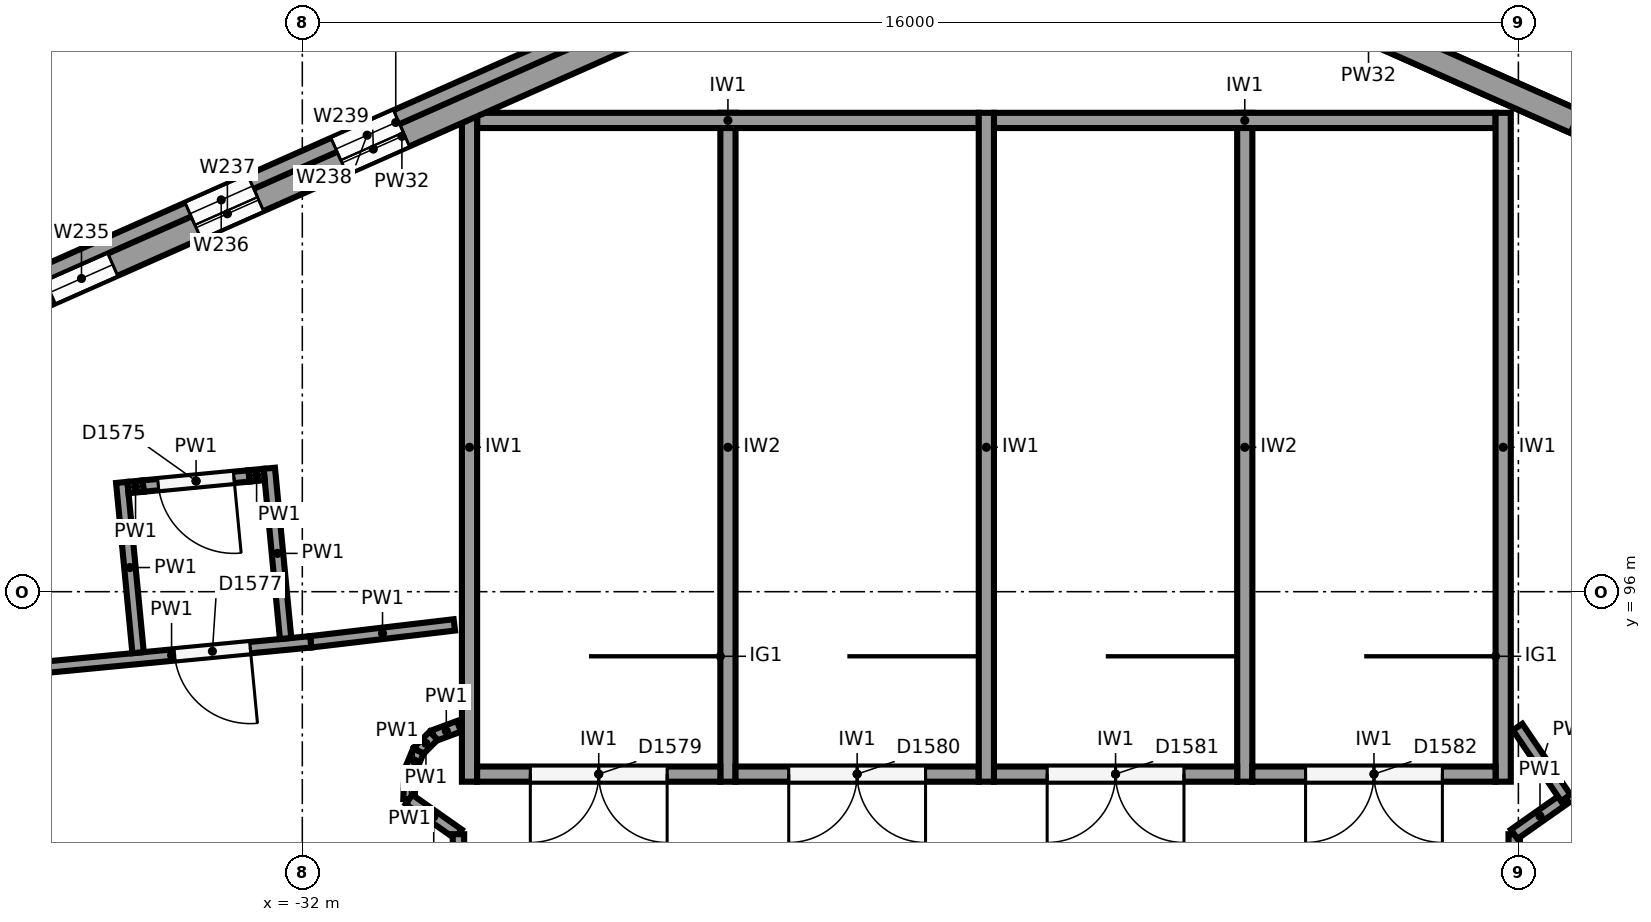
"""IFC4 building model, lengths in metres.
Left out: names, types, materials, properties, quantities, classifications, styles, units other than length and angle.
Written with IfcOpenShell. Run it as: python <this file> out.ifc"""

import sys

from ifc_helpers import new_model, si_unit, direction, frame, frame_2d, origin, place, context, subcontext, project, spatial, polyline, rectangle, outline, extrude, element, fill, save


model = new_model("IFC4")
c1 = context("Model", 3, precision=1e-05, world=origin(), true_north=direction((0.0, 1.0)))
c2 = subcontext(c1, "Body", "Model", "MODEL_VIEW")
j1 = project(units=[si_unit("LENGTHUNIT", "METRE"), si_unit("PLANEANGLEUNIT", "RADIAN")], contexts=[c1])
p1 = place(None, origin())
s1 = spatial("IfcSite", under=j1, at=p1, CompositionType="ELEMENT")
p2 = place(p1, origin())
s2 = spatial("IfcBuilding", under=s1, at=p2, CompositionType="ELEMENT")
p3 = place(p2, frame((0.0, 0.0, 24.0)))
s3 = spatial("IfcBuildingStorey", under=s2, at=p3, CompositionType="ELEMENT", Elevation=24.0)
p4 = place(p3, frame((-22.462, 105.38, 0.0), z_axis=(0.0, 0.0, 1.0), x_axis=(0.914133039962, -0.405414337745, 0.0)))
e1 = element("IfcWall", 1, at=p4, inside=s3, PredefinedType="SOLIDWALL", context=c2, shape_type="SweptSolid", body=[
    extrude(rectangle(XDim=9.824, YDim=0.32, at=frame_2d((4.912, 0.0))), origin(), (0.0, 0.0, 1.0), 6.0),
])
p5 = place(p4, frame((7.874, 0.0, 1.0)))
e2 = element("IfcOpeningElement", 2, at=p5, cuts=e1, PredefinedType="OPENING", context=c2, shape_type="SweptSolid", body=[
    extrude(rectangle(XDim=0.9, YDim=3.25, at=frame_2d((0.45, 1.625))), frame((0.0, 0.17, 0.0), z_axis=(0.0, -1.0, 0.0), x_axis=(1.0, 0.0, 0.0)), (0.0, 0.0, 1.0), 0.34),
])
p6 = place(p3, frame((-22.462, 105.38, 6.0), z_axis=(0.0, 0.0, 1.0), x_axis=(0.914133039962, -0.405414337745, 0.0)))
e3 = element("IfcWall", 3, at=p6, inside=s3, PredefinedType="SOLIDWALL", context=c2, shape_type="SweptSolid", body=[
    extrude(outline(polyline([(0.0, 0.0), (9.824, 0.0), (9.824, 6.505), (0.0, 10.488), (0.0, 0.0)])), frame((0.0, 0.16, 0.0), z_axis=(0.0, -1.0, 0.0), x_axis=(1.0, 0.0, 0.0)), (0.0, 0.0, 1.0), 0.32),
])
p7 = place(p6, frame((7.874, 0.0, 1.6)))
e4 = element("IfcOpeningElement", 4, at=p7, cuts=e3, PredefinedType="OPENING", context=c2, shape_type="SweptSolid", body=[
    extrude(rectangle(XDim=0.9, YDim=3.0, at=frame_2d((0.45, 1.5))), frame((0.0, 0.17, 0.0), z_axis=(0.0, -1.0, 0.0), x_axis=(1.0, 0.0, 0.0)), (0.0, 0.0, 1.0), 0.34),
])
p8 = place(p3, frame((-37.922, 98.782, 0.0), z_axis=(0.0, 0.0, 1.0), x_axis=(0.914138897099, 0.405401130748, 0.0)))
e5 = element("IfcWall", 5, at=p8, inside=s3, PredefinedType="SOLIDWALL", context=c2, shape_type="SweptSolid", body=[
    extrude(rectangle(XDim=15.824, YDim=0.32, at=frame_2d((7.912, 0.0))), origin(), (0.0, 0.0, 1.0), 6.0),
])
p9 = place(p8, frame((0.75, 0.0, 1.0)))
e6 = element("IfcOpeningElement", 6, at=p9, cuts=e5, PredefinedType="OPENING", context=c2, shape_type="SweptSolid", body=[
    extrude(rectangle(XDim=0.9, YDim=3.25, at=frame_2d((0.45, 1.625))), frame((0.0, 0.17, 0.0), z_axis=(0.0, -1.0, 0.0), x_axis=(1.0, 0.0, 0.0)), (0.0, 0.0, 1.0), 0.34),
])
p10 = place(p8, frame((2.85, 0.0, 1.0)))
e7 = element("IfcOpeningElement", 7, at=p10, cuts=e5, PredefinedType="OPENING", context=c2, shape_type="SweptSolid", body=[
    extrude(rectangle(XDim=0.9, YDim=3.25, at=frame_2d((0.45, 1.625))), frame((0.0, 0.17, 0.0), z_axis=(0.0, -1.0, 0.0), x_axis=(1.0, 0.0, 0.0)), (0.0, 0.0, 1.0), 0.34),
])
p11 = place(p8, frame((4.95, 0.0, 1.0)))
e8 = element("IfcOpeningElement", 8, at=p11, cuts=e5, PredefinedType="OPENING", context=c2, shape_type="SweptSolid", body=[
    extrude(rectangle(XDim=0.9, YDim=3.25, at=frame_2d((0.45, 1.625))), frame((0.0, 0.17, 0.0), z_axis=(0.0, -1.0, 0.0), x_axis=(1.0, 0.0, 0.0)), (0.0, 0.0, 1.0), 0.34),
])
p12 = place(p8, frame((7.05, 0.0, 1.0)))
e9 = element("IfcOpeningElement", 9, at=p12, cuts=e5, PredefinedType="OPENING", context=c2, shape_type="SweptSolid", body=[
    extrude(rectangle(XDim=0.9, YDim=3.25, at=frame_2d((0.45, 1.625))), frame((0.0, 0.17, 0.0), z_axis=(0.0, -1.0, 0.0), x_axis=(1.0, 0.0, 0.0)), (0.0, 0.0, 1.0), 0.34),
])
p13 = place(p3, frame((-38.003, 98.965, 6.0), z_axis=(0.0, 0.0, 1.0), x_axis=(0.914136361455, 0.405406848322, 0.0)))
e10 = element("IfcWall", 10, at=p13, inside=s3, PredefinedType="SOLIDWALL", context=c2, shape_type="SweptSolid", body=[
    extrude(outline(polyline([(0.0, 0.0), (15.824, 0.0), (15.824, 10.488), (0.0, 4.072), (0.0, 0.0)])), frame((0.0, 0.16, 0.0), z_axis=(0.0, -1.0, 0.0), x_axis=(1.0, 0.0, 0.0)), (0.0, 0.0, 1.0), 0.32),
])
p14 = place(p13, frame((4.95, 0.0, 1.6)))
e11 = element("IfcOpeningElement", 11, at=p14, cuts=e10, PredefinedType="OPENING", context=c2, shape_type="SweptSolid", body=[
    extrude(rectangle(XDim=0.9, YDim=3.0, at=frame_2d((0.45, 1.5))), frame((0.0, 0.17, 0.0), z_axis=(0.0, -1.0, 0.0), x_axis=(1.0, 0.0, 0.0)), (0.0, 0.0, 1.0), 0.34),
])
p15 = place(p13, frame((7.05, 0.0, 1.6)))
e12 = element("IfcOpeningElement", 12, at=p15, cuts=e10, PredefinedType="OPENING", context=c2, shape_type="SweptSolid", body=[
    extrude(rectangle(XDim=0.9, YDim=3.0, at=frame_2d((0.45, 1.5))), frame((0.0, 0.17, 0.0), z_axis=(0.0, -1.0, 0.0), x_axis=(1.0, 0.0, 0.0)), (0.0, 0.0, 1.0), 0.34),
])
for number, where, z_axis, x_axis in (
    (13, (-16.2, 102.3, 0.0), (0.0, 0.0, 1.0), (0.0, -1.0, 0.0)),
    (14, (-23.0, 102.3, 0.0), (0.0, 0.0, 1.0), (0.0, -1.0, 0.0)),
    (15, (-29.8, 102.3, 0.0), (0.0, 0.0, 1.0), (0.0, -1.0, 0.0)),
):
    element("IfcWall", number, at=place(p3, frame(where, z_axis=z_axis, x_axis=x_axis)), inside=s3, PredefinedType="SHEAR", context=c2, shape_type="SweptSolid", body=[
        extrude(rectangle(XDim=8.8, YDim=0.2, at=frame_2d((4.4, 0.0))), origin(), (0.0, 0.0, 1.0), 5.75),
    ])
for number, where, z_axis, x_axis in (
    (16, (-16.3, 102.2, 0.0), (0.0, 0.0, 1.0), (-1.0, 0.0, 0.0)),
    (17, (-23.1, 102.2, 0.0), (0.0, 0.0, 1.0), (-1.0, 0.0, 0.0)),
):
    element("IfcWall", number, at=place(p3, frame(where, z_axis=z_axis, x_axis=x_axis)), inside=s3, PredefinedType="SHEAR", context=c2, shape_type="SweptSolid", body=[
        extrude(rectangle(XDim=6.6, YDim=0.2, at=frame_2d((3.3, 0.0))), origin(), (0.0, 0.0, 1.0), 5.75),
    ])
for number, where, z_axis, x_axis in (
    (18, (-19.6, 102.3, 0.0), (0.0, 0.0, 1.0), (0.0, -1.0, 0.0)),
    (19, (-26.4, 102.3, 0.0), (0.0, 0.0, 1.0), (0.0, -1.0, 0.0)),
):
    element("IfcWall", number, at=place(p3, frame(where, z_axis=z_axis, x_axis=x_axis)), inside=s3, PredefinedType="SHEAR", context=c2, shape_type="SweptSolid", body=[
        extrude(rectangle(XDim=8.8, YDim=0.2, at=frame_2d((4.4, 0.0))), origin(), (0.0, 0.0, 1.0), 5.75),
    ])
p16 = place(p3, frame((-16.3, 93.6, 0.0), z_axis=(0.0, 0.0, 1.0), x_axis=(-1.0, 0.0, 0.0)))
e20 = element("IfcWall", 20, at=p16, inside=s3, PredefinedType="SHEAR", context=c2, shape_type="SweptSolid", body=[
    extrude(rectangle(XDim=3.2, YDim=0.2, at=frame_2d((1.6, 0.0))), origin(), (0.0, 0.0, 1.0), 5.75),
])
p17 = place(p16, frame((0.7, 0.0, 0.0)))
e21 = element("IfcOpeningElement", 21, at=p17, cuts=e20, PredefinedType="OPENING", context=c2, shape_type="SweptSolid", body=[
    extrude(rectangle(XDim=1.8, YDim=2.1, at=frame_2d((0.9, 1.05))), frame((0.0, 0.11, 0.0), z_axis=(0.0, -1.0, 0.0), x_axis=(1.0, 0.0, 0.0)), (0.0, 0.0, 1.0), 0.22),
])
p18 = place(p3, frame((-19.7, 93.6, 0.0), z_axis=(0.0, 0.0, 1.0), x_axis=(-1.0, 0.0, 0.0)))
e22 = element("IfcWall", 22, at=p18, inside=s3, PredefinedType="SHEAR", context=c2, shape_type="SweptSolid", body=[
    extrude(rectangle(XDim=3.2, YDim=0.2, at=frame_2d((1.6, 0.0))), origin(), (0.0, 0.0, 1.0), 5.75),
])
p19 = place(p18, frame((0.7, 0.0, 0.0)))
e23 = element("IfcOpeningElement", 23, at=p19, cuts=e22, PredefinedType="OPENING", context=c2, shape_type="SweptSolid", body=[
    extrude(rectangle(XDim=1.8, YDim=2.1, at=frame_2d((0.9, 1.05))), frame((0.0, 0.11, 0.0), z_axis=(0.0, -1.0, 0.0), x_axis=(1.0, 0.0, 0.0)), (0.0, 0.0, 1.0), 0.22),
])
p20 = place(p3, frame((-23.1, 93.6, 0.0), z_axis=(0.0, 0.0, 1.0), x_axis=(-1.0, 0.0, 0.0)))
e24 = element("IfcWall", 24, at=p20, inside=s3, PredefinedType="SHEAR", context=c2, shape_type="SweptSolid", body=[
    extrude(rectangle(XDim=3.2, YDim=0.2, at=frame_2d((1.6, 0.0))), origin(), (0.0, 0.0, 1.0), 5.75),
])
p21 = place(p20, frame((0.7, 0.0, 0.0)))
e25 = element("IfcOpeningElement", 25, at=p21, cuts=e24, PredefinedType="OPENING", context=c2, shape_type="SweptSolid", body=[
    extrude(rectangle(XDim=1.8, YDim=2.1, at=frame_2d((0.9, 1.05))), frame((0.0, 0.11, 0.0), z_axis=(0.0, -1.0, 0.0), x_axis=(1.0, 0.0, 0.0)), (0.0, 0.0, 1.0), 0.22),
])
p22 = place(p3, frame((-26.5, 93.6, 0.0), z_axis=(0.0, 0.0, 1.0), x_axis=(-1.0, 0.0, 0.0)))
e26 = element("IfcWall", 26, at=p22, inside=s3, PredefinedType="SHEAR", context=c2, shape_type="SweptSolid", body=[
    extrude(rectangle(XDim=3.2, YDim=0.2, at=frame_2d((1.6, 0.0))), origin(), (0.0, 0.0, 1.0), 5.75),
])
p23 = place(p22, frame((0.7, 0.0, 0.0)))
e27 = element("IfcOpeningElement", 27, at=p23, cuts=e26, PredefinedType="OPENING", context=c2, shape_type="SweptSolid", body=[
    extrude(rectangle(XDim=1.8, YDim=2.1, at=frame_2d((0.9, 1.05))), frame((0.0, 0.11, 0.0), z_axis=(0.0, -1.0, 0.0), x_axis=(1.0, 0.0, 0.0)), (0.0, 0.0, 1.0), 0.22),
])
p24 = place(p3, frame((-30.0, 95.563, 0.0), z_axis=(0.0, 0.0, 1.0), x_axis=(-0.993124293788, -0.117064670536, 0.0)))
e28 = element("IfcWall", 28, at=p24, inside=s3, PredefinedType="PARTITIONING", context=c2, shape_type="SweptSolid", body=[
    extrude(rectangle(XDim=1.902, YDim=0.15, at=frame_2d((0.951, 0.0))), origin(), (0.0, 0.0, 1.0), 5.4),
])
p25 = place(p3, frame((-31.889, 95.34, 0.0), z_axis=(0.0, 0.0, 1.0), x_axis=(-0.995436828667, -0.095422849118, 0.0)))
e29 = element("IfcWall", 29, at=p25, inside=s3, PredefinedType="PARTITIONING", context=c2, shape_type="SweptSolid", body=[
    extrude(rectangle(XDim=3.679, YDim=0.15, at=frame_2d((1.84, 0.0))), origin(), (0.0, 0.0, 1.0), 5.4),
])
p26 = place(p25, frame((0.8, 0.0, 0.0)))
e30 = element("IfcOpeningElement", 30, at=p26, cuts=e29, PredefinedType="OPENING", context=c2, shape_type="SweptSolid", body=[
    extrude(rectangle(XDim=1.0, YDim=2.1, at=frame_2d((0.5, 1.05))), frame((0.0, 0.085, 0.0), z_axis=(0.0, -1.0, 0.0), x_axis=(1.0, 0.0, 0.0)), (0.0, 0.0, 1.0), 0.17),
])
p27 = place(p3, frame((-29.938, 94.229, 0.0), z_axis=(0.0, 0.0, 1.0), x_axis=(-0.937674325327, -0.347515265308, 0.0)))
e31 = element("IfcWall", 31, at=p27, inside=s3, PredefinedType="PARTITIONING", context=c2, shape_type="SweptSolid", body=[
    extrude(rectangle(XDim=0.356, YDim=0.15, at=frame_2d((0.178, 0.0))), origin(), (0.0, 0.0, 1.0), 5.4),
])
p28 = place(p3, frame((-30.272, 94.105, 0.0), z_axis=(0.0, 0.0, 1.0), x_axis=(-0.707534941396, -0.706678361564, 0.0)))
e32 = element("IfcWall", 32, at=p28, inside=s3, PredefinedType="PARTITIONING", context=c2, shape_type="SweptSolid", body=[
    extrude(rectangle(XDim=0.285, YDim=0.15, at=frame_2d((0.143, 0.0))), origin(), (0.0, 0.0, 1.0), 5.4),
])
p29 = place(p3, frame((-30.474, 93.904, 0.0), z_axis=(0.0, 0.0, 1.0), x_axis=(-0.382275228123, -0.924048510611, 0.0)))
e33 = element("IfcWall", 33, at=p29, inside=s3, PredefinedType="PARTITIONING", context=c2, shape_type="SweptSolid", body=[
    extrude(rectangle(XDim=0.282, YDim=0.15, at=frame_2d((0.141, 0.0))), origin(), (0.0, 0.0, 1.0), 5.4),
])
p30 = place(p3, frame((-30.582, 93.643, 0.0), z_axis=(0.0, 0.0, 1.0), x_axis=(-0.038982051143, -0.999239910977, 0.0)))
e34 = element("IfcWall", 34, at=p30, inside=s3, PredefinedType="PARTITIONING", context=c2, shape_type="SweptSolid", body=[
    extrude(rectangle(XDim=0.376, YDim=0.15, at=frame_2d((0.188, 0.0))), origin(), (0.0, 0.0, 1.0), 5.4),
])
p31 = place(p3, frame((-30.596, 93.268, 0.0), z_axis=(0.0, 0.0, 1.0), x_axis=(0.817630031149, -0.575743981439, 0.0)))
e35 = element("IfcWall", 35, at=p31, inside=s3, PredefinedType="PARTITIONING", context=c2, shape_type="SweptSolid", body=[
    extrude(rectangle(XDim=0.796, YDim=0.15, at=frame_2d((0.398, 0.0))), origin(), (0.0, 0.0, 1.0), 5.4),
])
p32 = place(p3, frame((-29.945, 92.809, 0.0), z_axis=(0.0, 0.0, 1.0), x_axis=(-0.005947670427, -0.999982312452, 0.0)))
e36 = element("IfcWall", 36, at=p32, inside=s3, PredefinedType="PARTITIONING", context=c2, shape_type="SweptSolid", body=[
    extrude(rectangle(XDim=5.049, YDim=0.15, at=frame_2d((2.524, 0.0))), origin(), (0.0, 0.0, 1.0), 5.4),
])
p33 = place(p32, frame((1.85, 0.0, 0.0)))
e37 = element("IfcOpeningElement", 37, at=p33, cuts=e36, PredefinedType="OPENING", context=c2, shape_type="SweptSolid", body=[
    extrude(rectangle(XDim=1.8, YDim=2.1, at=frame_2d((0.9, 1.05))), frame((0.0, 0.085, 0.0), z_axis=(0.0, -1.0, 0.0), x_axis=(1.0, 0.0, 0.0)), (0.0, 0.0, 1.0), 0.17),
])
p34 = place(p3, frame((-16.055, 88.71, 0.0), z_axis=(0.0, 0.0, 1.0), x_axis=(0.0, 1.0, 0.0)))
e38 = element("IfcWall", 38, at=p34, inside=s3, PredefinedType="PARTITIONING", context=c2, shape_type="SweptSolid", body=[
    extrude(rectangle(XDim=4.099, YDim=0.15, at=frame_2d((2.05, 0.0))), origin(), (0.0, 0.0, 1.0), 5.4),
])
p35 = place(p3, frame((-16.055, 92.809, 0.0), z_axis=(0.0, 0.0, 1.0), x_axis=(0.81774999294, 0.575573582652, 0.0)))
e39 = element("IfcWall", 39, at=p35, inside=s3, PredefinedType="PARTITIONING", context=c2, shape_type="SweptSolid", body=[
    extrude(rectangle(XDim=0.83, YDim=0.15, at=frame_2d((0.415, 0.0))), origin(), (0.0, 0.0, 1.0), 5.4),
])
p36 = place(p3, frame((-15.376, 93.287, 0.0), z_axis=(0.0, 0.0, 1.0), x_axis=(-0.562120553728, 0.827055308354, 0.0)))
e40 = element("IfcWall", 40, at=p36, inside=s3, PredefinedType="PARTITIONING", context=c2, shape_type="SweptSolid", body=[
    extrude(rectangle(XDim=1.128, YDim=0.15, at=frame_2d((0.564, 0.0))), origin(), (0.0, 0.0, 1.0), 5.4),
])
for number, where, z_axis, x_axis in (
    (41, (-32.22, 95.384, 0.0), (0.0, 0.0, 1.0), (-0.095, 0.995, 0.0)),
    (42, (-34.161, 95.198, 0.0), (0.0, 0.0, 1.0), (-0.095, 0.995, 0.0)),
):
    element("IfcWall", number, at=place(p3, frame(where, z_axis=z_axis, x_axis=x_axis)), inside=s3, PredefinedType="PARTITIONING", context=c2, shape_type="SweptSolid", body=[
        extrude(rectangle(XDim=2.25, YDim=0.15, at=frame_2d((1.125, 0.0))), origin(), (0.0, 0.0, 1.0), 5.4),
    ])
p37 = place(p3, frame((-32.502, 97.542, 0.0), z_axis=(0.0, 0.0, 1.0), x_axis=(-0.995451449832, -0.095270200107, 0.0)))
e43 = element("IfcWall", 43, at=p37, inside=s3, PredefinedType="PARTITIONING", context=c2, shape_type="SweptSolid", body=[
    extrude(rectangle(XDim=0.2, YDim=0.15, at=frame_2d((0.1, 0.0))), origin(), (0.0, 0.0, 1.0), 5.4),
])
p38 = place(p3, frame((-32.701, 97.523, 0.0), z_axis=(0.0, 0.0, 1.0), x_axis=(-0.99543965186, -0.095393393407, 0.0)))
e44 = element("IfcWall", 44, at=p38, inside=s3, PredefinedType="PARTITIONING", context=c2, shape_type="SweptSolid", body=[
    extrude(rectangle(XDim=1.4, YDim=0.15, at=frame_2d((0.7, 0.0))), origin(), (0.0, 0.0, 1.0), 5.4),
])
p39 = place(p38, frame((0.2, 0.0, 0.0)))
e45 = element("IfcOpeningElement", 45, at=p39, cuts=e44, PredefinedType="OPENING", context=c2, shape_type="SweptSolid", body=[
    extrude(rectangle(XDim=1.0, YDim=2.1, at=frame_2d((0.5, 1.05))), frame((0.0, 0.085, 0.0), z_axis=(0.0, -1.0, 0.0), x_axis=(1.0, 0.0, 0.0)), (0.0, 0.0, 1.0), 0.17),
])
p40 = place(p3, frame((-34.094, 97.389, 0.0), z_axis=(0.0, 0.0, 1.0), x_axis=(-0.995346240255, -0.096363177672, 0.0)))
e46 = element("IfcWall", 46, at=p40, inside=s3, PredefinedType="PARTITIONING", context=c2, shape_type="SweptSolid", body=[
    extrude(rectangle(XDim=0.2, YDim=0.15, at=frame_2d((0.1, 0.0))), origin(), (0.0, 0.0, 1.0), 5.4),
])
p41 = place(p10, origin())
e47 = element("IfcWindow", 47, at=p41, inside=s3, PartitioningType="SINGLE_PANEL", PredefinedType="WINDOW", context=c2, shape_type="SweptSolid", body=[
    extrude(rectangle(XDim=0.9, YDim=3.25, at=frame_2d((0.45, 1.625))), frame((0.0, 0.03, 0.0), z_axis=(0.0, -1.0, 0.0), x_axis=(1.0, 0.0, 0.0)), (0.0, 0.0, 1.0), 0.06),
])
fill(e7, e47)
p42 = place(p11, origin())
e48 = element("IfcWindow", 48, at=p42, inside=s3, PartitioningType="SINGLE_PANEL", PredefinedType="WINDOW", context=c2, shape_type="SweptSolid", body=[
    extrude(rectangle(XDim=0.9, YDim=3.25, at=frame_2d((0.45, 1.625))), frame((0.0, 0.03, 0.0), z_axis=(0.0, -1.0, 0.0), x_axis=(1.0, 0.0, 0.0)), (0.0, 0.0, 1.0), 0.06),
])
fill(e8, e48)
p43 = place(p14, origin())
e49 = element("IfcWindow", 49, at=p43, inside=s3, PartitioningType="SINGLE_PANEL", PredefinedType="WINDOW", context=c2, shape_type="SweptSolid", body=[
    extrude(rectangle(XDim=0.9, YDim=3.0, at=frame_2d((0.45, 1.5))), frame((0.0, 0.03, 0.0), z_axis=(0.0, -1.0, 0.0), x_axis=(1.0, 0.0, 0.0)), (0.0, 0.0, 1.0), 0.06),
])
fill(e11, e49)
p44 = place(p12, origin())
e50 = element("IfcWindow", 50, at=p44, inside=s3, PartitioningType="SINGLE_PANEL", PredefinedType="WINDOW", context=c2, shape_type="SweptSolid", body=[
    extrude(rectangle(XDim=0.9, YDim=3.25, at=frame_2d((0.45, 1.625))), frame((0.0, 0.03, 0.0), z_axis=(0.0, -1.0, 0.0), x_axis=(1.0, 0.0, 0.0)), (0.0, 0.0, 1.0), 0.06),
])
fill(e9, e50)
p45 = place(p15, origin())
e51 = element("IfcWindow", 51, at=p45, inside=s3, PartitioningType="SINGLE_PANEL", PredefinedType="WINDOW", context=c2, shape_type="SweptSolid", body=[
    extrude(rectangle(XDim=0.9, YDim=3.0, at=frame_2d((0.45, 1.5))), frame((0.0, 0.03, 0.0), z_axis=(0.0, -1.0, 0.0), x_axis=(1.0, 0.0, 0.0)), (0.0, 0.0, 1.0), 0.06),
])
fill(e12, e51)
p46 = place(p17, origin())
e52 = element("IfcDoor", 52, at=p46, inside=s3, OperationType="DOUBLE_DOOR_SINGLE_SWING", PredefinedType="DOOR", context=c2, shape_type="SweptSolid", body=[
    extrude(rectangle(XDim=1.8, YDim=2.1, at=frame_2d((0.9, 1.05))), frame((0.0, 0.025, 0.0), z_axis=(0.0, -1.0, 0.0), x_axis=(1.0, 0.0, 0.0)), (0.0, 0.0, 1.0), 0.05),
])
fill(e21, e52)
p47 = place(p19, origin())
e53 = element("IfcDoor", 53, at=p47, inside=s3, OperationType="DOUBLE_DOOR_SINGLE_SWING", PredefinedType="DOOR", context=c2, shape_type="SweptSolid", body=[
    extrude(rectangle(XDim=1.8, YDim=2.1, at=frame_2d((0.9, 1.05))), frame((0.0, 0.025, 0.0), z_axis=(0.0, -1.0, 0.0), x_axis=(1.0, 0.0, 0.0)), (0.0, 0.0, 1.0), 0.05),
])
fill(e23, e53)
p48 = place(p21, origin())
e54 = element("IfcDoor", 54, at=p48, inside=s3, OperationType="DOUBLE_DOOR_SINGLE_SWING", PredefinedType="DOOR", context=c2, shape_type="SweptSolid", body=[
    extrude(rectangle(XDim=1.8, YDim=2.1, at=frame_2d((0.9, 1.05))), frame((0.0, 0.025, 0.0), z_axis=(0.0, -1.0, 0.0), x_axis=(1.0, 0.0, 0.0)), (0.0, 0.0, 1.0), 0.05),
])
fill(e25, e54)
p49 = place(p23, origin())
e55 = element("IfcDoor", 55, at=p49, inside=s3, OperationType="DOUBLE_DOOR_SINGLE_SWING", PredefinedType="DOOR", context=c2, shape_type="SweptSolid", body=[
    extrude(rectangle(XDim=1.8, YDim=2.1, at=frame_2d((0.9, 1.05))), frame((0.0, 0.025, 0.0), z_axis=(0.0, -1.0, 0.0), x_axis=(1.0, 0.0, 0.0)), (0.0, 0.0, 1.0), 0.05),
])
fill(e27, e55)
p50 = place(p26, origin())
e56 = element("IfcDoor", 56, at=p50, inside=s3, OperationType="SINGLE_SWING_LEFT", PredefinedType="DOOR", context=c2, shape_type="SweptSolid", body=[
    extrude(rectangle(XDim=1.0, YDim=2.1, at=frame_2d((0.5, 1.05))), frame((0.0, 0.025, 0.0), z_axis=(0.0, -1.0, 0.0), x_axis=(1.0, 0.0, 0.0)), (0.0, 0.0, 1.0), 0.05),
])
fill(e30, e56)
p51 = place(p39, origin())
e57 = element("IfcDoor", 57, at=p51, inside=s3, OperationType="SINGLE_SWING_LEFT", PredefinedType="DOOR", context=c2, shape_type="SweptSolid", body=[
    extrude(rectangle(XDim=1.0, YDim=2.1, at=frame_2d((0.5, 1.05))), frame((0.0, 0.025, 0.0), z_axis=(0.0, -1.0, 0.0), x_axis=(1.0, 0.0, 0.0)), (0.0, 0.0, 1.0), 0.05),
])
fill(e45, e57)
save(model, sys.argv[1])
